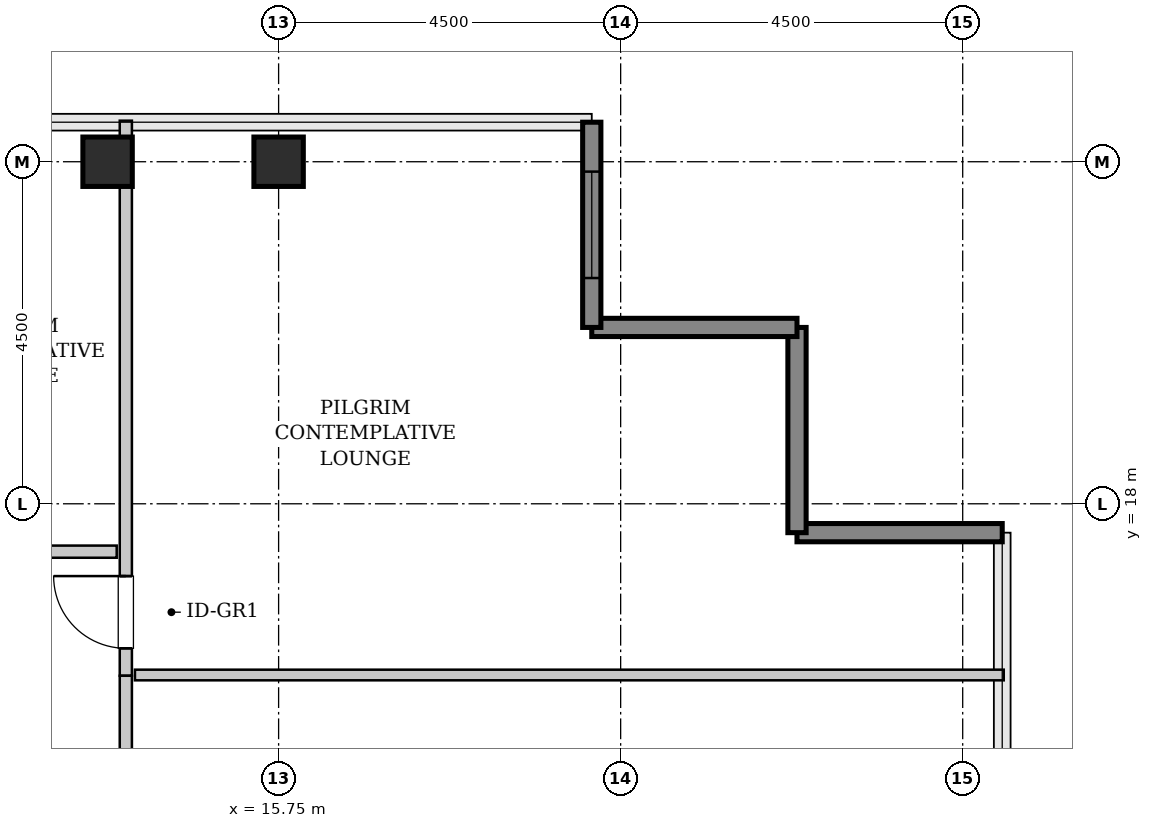
"""IFC4 building model, lengths in metres.
Left out: names, types, materials, properties, quantities, classifications, styles, units other than length and angle.
Written with IfcOpenShell. Run it as: python <this file> out.ifc"""

import sys

from ifc_helpers import new_model, si_unit, direction, frame, frame_2d, origin, origin_2d, place, context, subcontext, project, spatial, rectangle, hollow_rectangle, extrude, source, transform, mapped, element, fill, save


model = new_model("IFC4")
c1 = context("Model", 3, precision=1e-05, world=origin(), true_north=direction((0.0, 1.0)))
c2 = subcontext(c1, "Body", "Model", "MODEL_VIEW")
j1 = project(units=[si_unit("LENGTHUNIT", "METRE"), si_unit("PLANEANGLEUNIT", "RADIAN")], contexts=[c1])
p1 = place(None, origin())
s1 = spatial("IfcSite", under=j1, at=p1, CompositionType="ELEMENT")
p2 = place(p1, origin())
s2 = spatial("IfcBuilding", under=s1, at=p2, CompositionType="ELEMENT")
p3 = place(p2, frame((0.0, 0.0, 248.4)))
s3 = spatial("IfcBuildingStorey", under=s2, at=p3, CompositionType="ELEMENT", Elevation=248.4)
m1 = source(origin(), c2, "Body", "SweptSolid", [
    extrude(hollow_rectangle(XDim=0.65, YDim=0.65, WallThickness=0.032, InnerFilletRadius=0.032, OuterFilletRadius=0.064, at=origin_2d()), origin(), (0.0, 0.0, 1.0), 3.8),
])
for number, where, z_axis, x_axis in (
    (1, (13.5, 22.5, 0.0), (0.0, 0.0, 1.0), (1.0, 0.0, 0.0)),
    (2, (15.75, 22.5, 0.0), (0.0, 0.0, 1.0), (1.0, 0.0, 0.0)),
):
    element("IfcColumn", number, at=place(p3, frame(where, z_axis=z_axis, x_axis=x_axis)), inside=s3, PredefinedType="COLUMN", context=c2, shape_type="MappedRepresentation", body=[
        mapped(m1, transform((0.0, 0.0, 0.0), x_axis=(1.0, 0.0, 0.0), y_axis=(0.0, 1.0, 0.0), z_axis=(0.0, 0.0, 1.0), scale=1.0)),
    ])
m2 = source(origin(), c2, "Body", "SweptSolid", [
    extrude(rectangle(XDim=2.7, YDim=0.24, at=frame_2d((1.35, 0.0))), origin(), (0.0, 0.0, 1.0), 3.55),
])
for number, where, z_axis, x_axis in (
    (3, (25.27, 17.62, 0.0), (0.0, 0.0, 1.0), (-1.0, 0.0, 0.0)),
    (4, (22.57, 17.62, 0.0), (0.0, 0.0, 1.0), (0.0, 1.0, 0.0)),
    (5, (22.57, 20.32, 0.0), (0.0, 0.0, 1.0), (-1.0, 0.0, 0.0)),
):
    element("IfcWall", number, at=place(p3, frame(where, z_axis=z_axis, x_axis=x_axis)), inside=s3, PredefinedType="SHEAR", context=c2, shape_type="MappedRepresentation", body=[
        mapped(m2, transform((0.0, 0.0, 0.0), x_axis=(1.0, 0.0, 0.0), y_axis=(0.0, 1.0, 0.0), z_axis=(0.0, 0.0, 1.0), scale=1.0)),
    ])
p4 = place(p3, frame((19.87, 20.32, 0.0), z_axis=(0.0, 0.0, 1.0), x_axis=(0.0, 1.0, 0.0)))
e6 = element("IfcWall", 6, at=p4, inside=s3, PredefinedType="SHEAR", context=c2, shape_type="MappedRepresentation", body=[
    mapped(m2, transform((0.0, 0.0, 0.0), x_axis=(1.0, 0.0, 0.0), y_axis=(0.0, 1.0, 0.0), z_axis=(0.0, 0.0, 1.0), scale=1.0)),
])
p5 = place(p4, frame((0.65, 0.0, 0.85)))
e7 = element("IfcOpeningElement", 7, at=p5, cuts=e6, PredefinedType="OPENING", context=c2, shape_type="SweptSolid", body=[
    extrude(rectangle(XDim=1.4, YDim=1.8, at=frame_2d((0.7, 0.9))), frame((0.0, 0.13, 0.0), z_axis=(0.0, -1.0, 0.0), x_axis=(1.0, 0.0, 0.0)), (0.0, 0.0, 1.0), 0.26),
])
m3 = source(origin(), c2, "Body", "SweptSolid", [
    extrude(rectangle(XDim=7.302, YDim=0.16, at=frame_2d((3.651, 0.0))), origin(), (0.0, 0.0, 1.0), 3.535),
])
p6 = place(p3, frame((13.74, 15.738, 0.0), z_axis=(0.0, 0.0, 1.0), x_axis=(0.0, 1.0, 0.0)))
e8 = element("IfcWall", 8, at=p6, inside=s3, PredefinedType="PARTITIONING", context=c2, shape_type="MappedRepresentation", body=[
    mapped(m3, transform((0.0, 0.0, 0.0), x_axis=(1.0, 0.0, 0.0), y_axis=(0.0, 1.0, 0.0), z_axis=(0.0, 0.0, 1.0), scale=1.0)),
])
p7 = place(p6, frame((0.361, 0.0, 0.0)))
e9 = element("IfcOpeningElement", 9, at=p7, cuts=e8, PredefinedType="OPENING", context=c2, shape_type="SweptSolid", body=[
    extrude(rectangle(XDim=0.95, YDim=2.1, at=frame_2d((0.475, 1.05))), frame((0.0, 0.09, 0.0), z_axis=(0.0, -1.0, 0.0), x_axis=(1.0, 0.0, 0.0)), (0.0, 0.0, 1.0), 0.18),
])
m4 = source(origin(), c2, "Body", "SweptSolid", [
    extrude(rectangle(XDim=11.43, YDim=0.14, at=frame_2d((5.715, 0.0))), origin(), (0.0, 0.0, 1.0), 3.535),
])
p8 = place(p3, frame((13.86, 15.748, 0.0), z_axis=(0.0, 0.0, 1.0), x_axis=(1.0, 0.0, 0.0)))
e10 = element("IfcWall", 10, at=p8, inside=s3, PredefinedType="PARTITIONING", context=c2, shape_type="MappedRepresentation", body=[
    mapped(m4, transform((0.0, 0.0, 0.0), x_axis=(1.0, 0.0, 0.0), y_axis=(0.0, 1.0, 0.0), z_axis=(0.0, 0.0, 1.0), scale=1.0)),
])
m5 = source(origin(), c2, "Body", "SweptSolid", [
    extrude(rectangle(XDim=7.242, YDim=0.16, at=frame_2d((3.621, 0.0))), origin(), (0.0, 0.0, 1.0), 3.535),
])
p9 = place(p3, frame((13.74, 8.495, 0.0), z_axis=(0.0, 0.0, 1.0), x_axis=(0.0, 1.0, 0.0)))
e11 = element("IfcWall", 11, at=p9, inside=s3, PredefinedType="PARTITIONING", context=c2, shape_type="MappedRepresentation", body=[
    mapped(m5, transform((0.0, 0.0, 0.0), x_axis=(1.0, 0.0, 0.0), y_axis=(0.0, 1.0, 0.0), z_axis=(0.0, 0.0, 1.0), scale=1.0)),
])
p10 = place(p9, frame((3.146, 0.0, 0.0)))
e12 = element("IfcOpeningElement", 12, at=p10, cuts=e11, PredefinedType="OPENING", context=c2, shape_type="SweptSolid", body=[
    extrude(rectangle(XDim=0.95, YDim=2.1, at=frame_2d((0.475, 1.05))), frame((0.0, 0.09, 0.0), z_axis=(0.0, -1.0, 0.0), x_axis=(1.0, 0.0, 0.0)), (0.0, 0.0, 1.0), 0.18),
])
m6 = source(origin(), c2, "Body", "SweptSolid", [
    extrude(rectangle(XDim=5.225, YDim=0.16, at=frame_2d((2.613, 0.0))), origin(), (0.0, 0.0, 1.0), 3.535),
])
p11 = place(p3, frame((8.395, 17.37, 0.0), z_axis=(0.0, 0.0, 1.0), x_axis=(1.0, 0.0, 0.0)))
e13 = element("IfcWall", 13, at=p11, inside=s3, PredefinedType="PARTITIONING", context=c2, shape_type="MappedRepresentation", body=[
    mapped(m6, transform((0.0, 0.0, 0.0), x_axis=(1.0, 0.0, 0.0), y_axis=(0.0, 1.0, 0.0), z_axis=(0.0, 0.0, 1.0), scale=1.0)),
])
p12 = place(p11, frame((1.543, 0.0, 0.0)))
e14 = element("IfcOpeningElement", 14, at=p12, cuts=e13, PredefinedType="OPENING", context=c2, shape_type="SweptSolid", body=[
    extrude(rectangle(XDim=0.95, YDim=2.1, at=frame_2d((0.475, 1.05))), frame((0.0, 0.09, 0.0), z_axis=(0.0, -1.0, 0.0), x_axis=(1.0, 0.0, 0.0)), (0.0, 0.0, 1.0), 0.18),
])
m7 = source(origin(), c2, "Body", "SweptSolid", [
    extrude(rectangle(XDim=1.4, YDim=1.8, at=frame_2d((0.7, 0.9))), frame((0.0, 0.03, 0.0), z_axis=(0.0, -1.0, 0.0), x_axis=(1.0, 0.0, 0.0)), (0.0, 0.0, 1.0), 0.06),
])
p13 = place(p5, origin())
e15 = element("IfcWindow", 15, at=p13, inside=s3, PartitioningType="SINGLE_PANEL", PredefinedType="WINDOW", context=c2, shape_type="MappedRepresentation", body=[
    mapped(m7, transform((0.0, 0.0, 0.0), x_axis=(1.0, 0.0, 0.0), y_axis=(0.0, 1.0, 0.0), z_axis=(0.0, 0.0, 1.0), scale=1.0)),
])
fill(e7, e15)
m8 = source(origin(), c2, "Body", "SweptSolid", [
    extrude(rectangle(XDim=0.95, YDim=2.1, at=frame_2d((0.475, 1.05))), frame((0.0, 0.025, 0.0), z_axis=(0.0, -1.0, 0.0), x_axis=(1.0, 0.0, 0.0)), (0.0, 0.0, 1.0), 0.05),
])
p14 = place(p7, origin())
e16 = element("IfcDoor", 16, at=p14, inside=s3, OperationType="SINGLE_SWING_RIGHT", PredefinedType="DOOR", context=c2, shape_type="MappedRepresentation", body=[
    mapped(m8, transform((0.0, 0.0, 0.0), x_axis=(1.0, 0.0, 0.0), y_axis=(0.0, 1.0, 0.0), z_axis=(0.0, 0.0, 1.0), scale=1.0)),
])
fill(e9, e16)
save(model, sys.argv[1])
